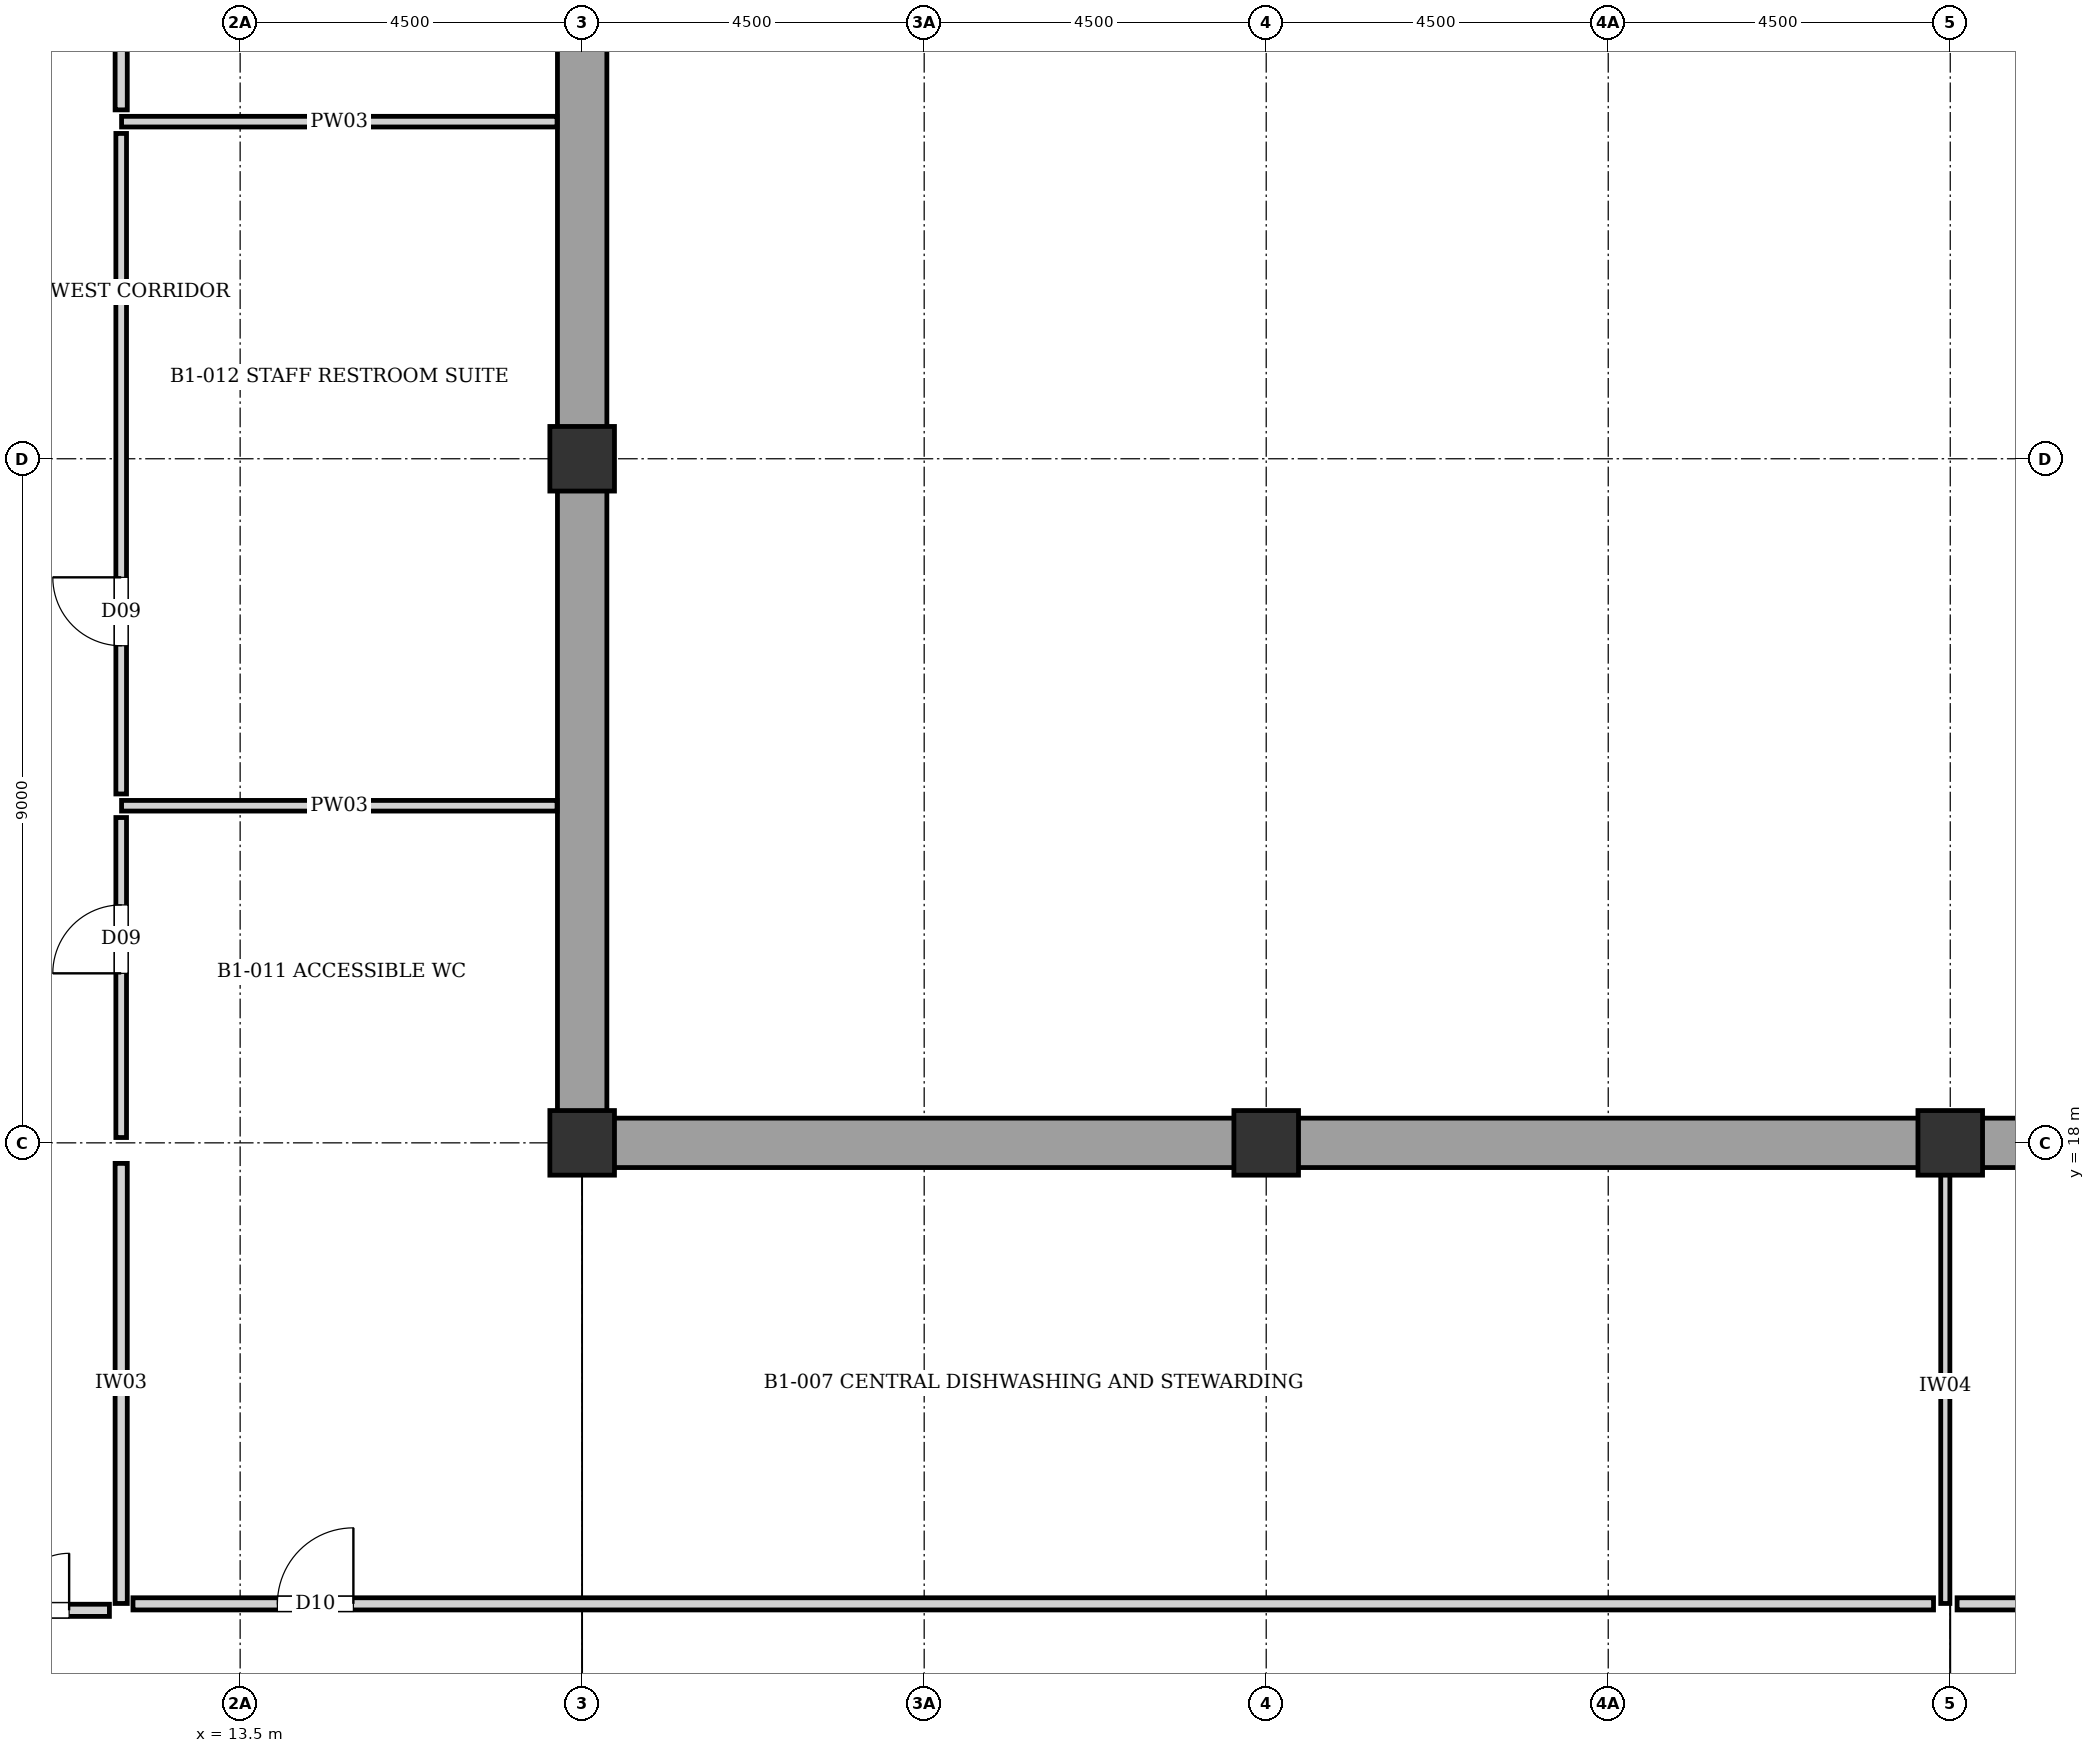
"""IFC4 building model, lengths in metres.
Left out: names, types, materials, properties, quantities, classifications, styles, units other than length and angle.
Written with IfcOpenShell. Run it as: python <this file> out.ifc"""

import sys

from ifc_helpers import new_model, si_unit, direction, frame, frame_2d, origin, origin_2d, place, context, subcontext, project, spatial, rectangle, extrude, element, fill, save


model = new_model("IFC4")
c1 = context("Model", 3, precision=1e-05, world=origin(), true_north=direction((0.0, 1.0)))
c2 = subcontext(c1, "Body", "Model", "MODEL_VIEW")
j1 = project(units=[si_unit("LENGTHUNIT", "METRE"), si_unit("PLANEANGLEUNIT", "RADIAN")], contexts=[c1])
p1 = place(None, origin())
s1 = spatial("IfcSite", under=j1, at=p1, CompositionType="ELEMENT")
p2 = place(p1, origin())
s2 = spatial("IfcBuilding", under=s1, at=p2, CompositionType="ELEMENT")
p3 = place(p2, frame((0.0, 0.0, -4.48)))
s3 = spatial("IfcBuildingStorey", under=s2, at=p3, CompositionType="ELEMENT", Elevation=-4.48)
for number, where, z_axis, x_axis in (
    (1, (18.0, 18.0, 0.0), (0.0, 0.0, 1.0), (1.0, 0.0, 0.0)),
    (2, (18.0, 27.0, 0.0), (0.0, 0.0, 1.0), (1.0, 0.0, 0.0)),
    (3, (27.0, 18.0, 0.0), (0.0, 0.0, 1.0), (1.0, 0.0, 0.0)),
    (4, (36.0, 18.0, 0.0), (0.0, 0.0, 1.0), (1.0, 0.0, 0.0)),
):
    element("IfcColumn", number, at=place(p3, frame(where, z_axis=z_axis, x_axis=x_axis)), inside=s3, PredefinedType="COLUMN", context=c2, shape_type="SweptSolid", body=[
        extrude(rectangle(XDim=0.85, YDim=0.85, at=origin_2d()), origin(), (0.0, 0.0, 1.0), 4.48),
    ])
for number, where, z_axis, x_axis in (
    (5, (18.0, 36.0, 0.0), (0.0, 0.0, 1.0), (0.0, -1.0, 0.0)),
    (6, (18.0, 27.0, 0.0), (0.0, 0.0, 1.0), (0.0, -1.0, 0.0)),
    (7, (18.0, 18.0, 0.0), (0.0, 0.0, 1.0), (1.0, 0.0, 0.0)),
    (8, (27.0, 18.0, 0.0), (0.0, 0.0, 1.0), (1.0, 0.0, 0.0)),
    (9, (36.0, 18.0, 0.0), (0.0, 0.0, 1.0), (1.0, 0.0, 0.0)),
):
    element("IfcWall", number, at=place(p3, frame(where, z_axis=z_axis, x_axis=x_axis)), inside=s3, PredefinedType="USERDEFINED", context=c2, shape_type="SweptSolid", body=[
        extrude(rectangle(XDim=9.0, YDim=0.65, at=frame_2d((4.5, 0.0))), origin(), (0.0, 0.0, 1.0), 4.22),
    ])
p4 = place(p3, frame((11.935, 11.94, 0.0), z_axis=(0.0, 0.0, 1.0), x_axis=(0.0, 1.0, 0.0)))
e10 = element("IfcWall", 10, at=p4, inside=s3, PredefinedType="PARTITIONING", context=c2, shape_type="SweptSolid", body=[
    extrude(rectangle(XDim=5.79, YDim=0.16, at=frame_2d((2.895, 0.0))), origin(), (0.0, 0.0, 1.0), 4.22),
])
p5 = place(p3, frame((35.935, 11.94, 0.0), z_axis=(0.0, 0.0, 1.0), x_axis=(0.0, 1.0, 0.0)))
e11 = element("IfcWall", 11, at=p5, inside=s3, PredefinedType="PARTITIONING", context=c2, shape_type="SweptSolid", body=[
    extrude(rectangle(XDim=5.73, YDim=0.12, at=frame_2d((2.865, 0.0))), origin(), (0.0, 0.0, 1.0), 3.32),
])
for number, where, z_axis, x_axis in (
    (12, (11.94, 22.435, 0.0), (0.0, 0.0, 1.0), (1.0, 0.0, 0.0)),
    (13, (11.94, 31.435, 0.0), (0.0, 0.0, 1.0), (1.0, 0.0, 0.0)),
):
    element("IfcWall", number, at=place(p3, frame(where, z_axis=z_axis, x_axis=x_axis)), inside=s3, PredefinedType="PLUMBINGWALL", context=c2, shape_type="SweptSolid", body=[
        extrude(rectangle(XDim=5.73, YDim=0.14, at=frame_2d((2.865, 0.0))), origin(), (0.0, 0.0, 1.0), 4.22),
    ])
p6 = place(p3, frame((9.22, 11.85, 0.0), z_axis=(0.0, 0.0, 1.0), x_axis=(1.0, 0.0, 0.0)))
e14 = element("IfcWall", 14, at=p6, inside=s3, PredefinedType="PARTITIONING", context=c2, shape_type="SweptSolid", body=[
    extrude(rectangle(XDim=2.56, YDim=0.16, at=frame_2d((1.28, 0.0))), origin(), (0.0, 0.0, 1.0), 4.22),
])
p7 = place(p6, frame((0.53, 0.0, 0.0)))
e15 = element("IfcOpeningElement", 15, at=p7, cuts=e14, PredefinedType="OPENING", context=c2, shape_type="SweptSolid", body=[
    extrude(rectangle(XDim=1.5, YDim=2.1, at=frame_2d((0.75, 1.05))), frame((0.0, 0.09, 0.0), z_axis=(0.0, -1.0, 0.0), x_axis=(1.0, 0.0, 0.0)), (0.0, 0.0, 1.0), 0.18),
])
p8 = place(p3, frame((12.09, 11.935, 0.0), z_axis=(0.0, 0.0, 1.0), x_axis=(1.0, 0.0, 0.0)))
e16 = element("IfcWall", 16, at=p8, inside=s3, PredefinedType="PARTITIONING", context=c2, shape_type="SweptSolid", body=[
    extrude(rectangle(XDim=23.69, YDim=0.16, at=frame_2d((11.845, 0.0))), origin(), (0.0, 0.0, 1.0), 4.22),
])
p9 = place(p8, frame((1.9, 0.0, 0.0)))
e17 = element("IfcOpeningElement", 17, at=p9, cuts=e16, PredefinedType="OPENING", context=c2, shape_type="SweptSolid", body=[
    extrude(rectangle(XDim=1.0, YDim=2.1, at=frame_2d((0.5, 1.05))), frame((0.0, 0.09, 0.0), z_axis=(0.0, -1.0, 0.0), x_axis=(1.0, 0.0, 0.0)), (0.0, 0.0, 1.0), 0.18),
])
p10 = place(p3, frame((36.09, 11.935, 0.0), z_axis=(0.0, 0.0, 1.0), x_axis=(1.0, 0.0, 0.0)))
e18 = element("IfcWall", 18, at=p10, inside=s3, PredefinedType="PARTITIONING", context=c2, shape_type="SweptSolid", body=[
    extrude(rectangle(XDim=35.58, YDim=0.16, at=frame_2d((17.79, 0.0))), origin(), (0.0, 0.0, 1.0), 4.22),
])
p11 = place(p10, frame((13.021, 0.0, 0.0)))
e19 = element("IfcOpeningElement", 19, at=p11, cuts=e18, PredefinedType="OPENING", context=c2, shape_type="SweptSolid", body=[
    extrude(rectangle(XDim=1.0, YDim=2.1, at=frame_2d((0.5, 1.05))), frame((0.0, 0.09, 0.0), z_axis=(0.0, -1.0, 0.0), x_axis=(1.0, 0.0, 0.0)), (0.0, 0.0, 1.0), 0.18),
])
p12 = place(p3, frame((11.935, 18.07, 0.0), z_axis=(0.0, 0.0, 1.0), x_axis=(0.0, 1.0, 0.0)))
e20 = element("IfcWall", 20, at=p12, inside=s3, PredefinedType="PLUMBINGWALL", context=c2, shape_type="SweptSolid", body=[
    extrude(rectangle(XDim=4.21, YDim=0.14, at=frame_2d((2.105, 0.0))), origin(), (0.0, 0.0, 1.0), 4.22),
])
p13 = place(p12, frame((2.16, 0.0, 0.0)))
e21 = element("IfcOpeningElement", 21, at=p13, cuts=e20, PredefinedType="OPENING", context=c2, shape_type="SweptSolid", body=[
    extrude(rectangle(XDim=0.9, YDim=2.1, at=frame_2d((0.45, 1.05))), frame((0.0, 0.08, 0.0), z_axis=(0.0, -1.0, 0.0), x_axis=(1.0, 0.0, 0.0)), (0.0, 0.0, 1.0), 0.16),
])
p14 = place(p3, frame((11.935, 22.59, 0.0), z_axis=(0.0, 0.0, 1.0), x_axis=(0.0, 1.0, 0.0)))
e22 = element("IfcWall", 22, at=p14, inside=s3, PredefinedType="PLUMBINGWALL", context=c2, shape_type="SweptSolid", body=[
    extrude(rectangle(XDim=8.69, YDim=0.14, at=frame_2d((4.345, 0.0))), origin(), (0.0, 0.0, 1.0), 4.22),
])
p15 = place(p14, frame((1.95, 0.0, 0.0)))
e23 = element("IfcOpeningElement", 23, at=p15, cuts=e22, PredefinedType="OPENING", context=c2, shape_type="SweptSolid", body=[
    extrude(rectangle(XDim=0.9, YDim=2.1, at=frame_2d((0.45, 1.05))), frame((0.0, 0.08, 0.0), z_axis=(0.0, -1.0, 0.0), x_axis=(1.0, 0.0, 0.0)), (0.0, 0.0, 1.0), 0.16),
])
p16 = place(p3, frame((11.935, 31.59, 0.0), z_axis=(0.0, 0.0, 1.0), x_axis=(0.0, 1.0, 0.0)))
e24 = element("IfcWall", 24, at=p16, inside=s3, PredefinedType="PARTITIONING", context=c2, shape_type="SweptSolid", body=[
    extrude(rectangle(XDim=40.08, YDim=0.16, at=frame_2d((20.04, 0.0))), origin(), (0.0, 0.0, 1.0), 4.22),
])
p17 = place(p16, frame((37.18, 0.0, 0.0)))
e25 = element("IfcOpeningElement", 25, at=p17, cuts=e24, PredefinedType="OPENING", context=c2, shape_type="SweptSolid", body=[
    extrude(rectangle(XDim=1.0, YDim=2.1, at=frame_2d((0.5, 1.05))), frame((0.0, 0.09, 0.0), z_axis=(0.0, -1.0, 0.0), x_axis=(1.0, 0.0, 0.0)), (0.0, 0.0, 1.0), 0.18),
])
p18 = place(p7, origin())
e26 = element("IfcDoor", 26, at=p18, inside=s3, OperationType="DOUBLE_DOOR_SINGLE_SWING", PredefinedType="DOOR", context=c2, shape_type="SweptSolid", body=[
    extrude(rectangle(XDim=1.5, YDim=2.1, at=frame_2d((0.75, 1.05))), frame((0.0, 0.025, 0.0), z_axis=(0.0, -1.0, 0.0), x_axis=(1.0, 0.0, 0.0)), (0.0, 0.0, 1.0), 0.05),
])
fill(e15, e26)
p19 = place(p9, origin())
e27 = element("IfcDoor", 27, at=p19, inside=s3, OperationType="SINGLE_SWING_RIGHT", PredefinedType="DOOR", context=c2, shape_type="SweptSolid", body=[
    extrude(rectangle(XDim=1.0, YDim=2.1, at=frame_2d((0.5, 1.05))), frame((0.0, 0.025, 0.0), z_axis=(0.0, -1.0, 0.0), x_axis=(1.0, 0.0, 0.0)), (0.0, 0.0, 1.0), 0.05),
])
fill(e17, e27)
p20 = place(p13, origin())
e28 = element("IfcDoor", 28, at=p20, inside=s3, OperationType="SINGLE_SWING_LEFT", PredefinedType="DOOR", context=c2, shape_type="SweptSolid", body=[
    extrude(rectangle(XDim=0.9, YDim=2.1, at=frame_2d((0.45, 1.05))), frame((0.0, 0.025, 0.0), z_axis=(0.0, -1.0, 0.0), x_axis=(1.0, 0.0, 0.0)), (0.0, 0.0, 1.0), 0.05),
])
fill(e21, e28)
p21 = place(p15, origin())
e29 = element("IfcDoor", 29, at=p21, inside=s3, OperationType="SINGLE_SWING_RIGHT", PredefinedType="DOOR", context=c2, shape_type="SweptSolid", body=[
    extrude(rectangle(XDim=0.9, YDim=2.1, at=frame_2d((0.45, 1.05))), frame((0.0, 0.025, 0.0), z_axis=(0.0, -1.0, 0.0), x_axis=(1.0, 0.0, 0.0)), (0.0, 0.0, 1.0), 0.05),
])
fill(e23, e29)
save(model, sys.argv[1])
